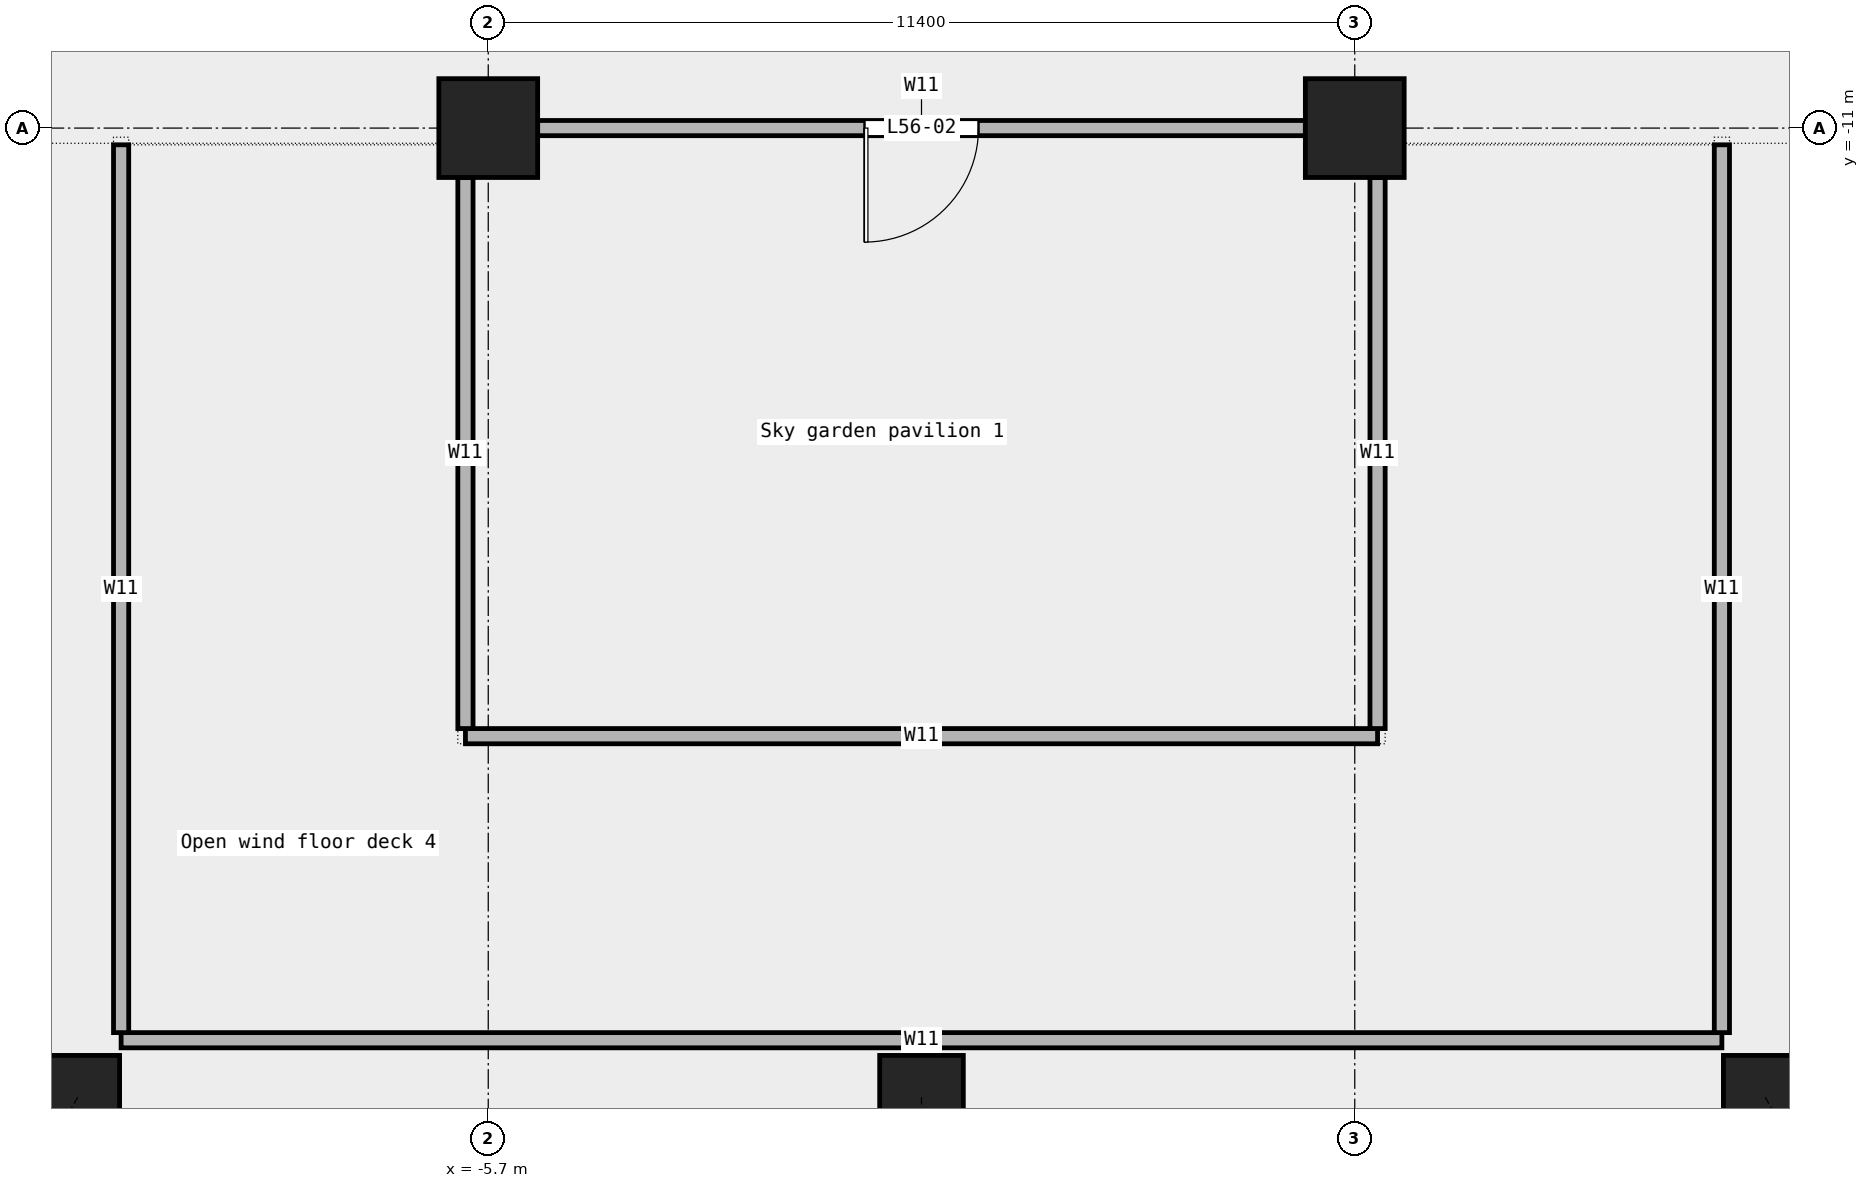
"""IFC4 building model, lengths in metres.
Left out: names, types, materials, properties, quantities, classifications, styles, units other than length and angle.
Written with IfcOpenShell. Run it as: python <this file> out.ifc"""

import sys

from ifc_helpers import new_model, si_unit, direction, frame, frame_2d, origin, origin_2d, place, context, subcontext, project, spatial, rectangle, extrude, element, fill, save


model = new_model("IFC4")
c1 = context("Model", 3, precision=1e-05, world=origin(), true_north=direction((0.0, 1.0)))
c2 = subcontext(c1, "Body", "Model", "MODEL_VIEW")
j1 = project(units=[si_unit("LENGTHUNIT", "METRE"), si_unit("PLANEANGLEUNIT", "RADIAN")], contexts=[c1])
p1 = place(None, origin())
s1 = spatial("IfcSite", under=j1, at=p1, CompositionType="ELEMENT")
p2 = place(p1, origin())
s2 = spatial("IfcBuilding", under=s1, at=p2, CompositionType="ELEMENT")
p3 = place(p2, frame((0.0, 0.0, 259.0)))
s3 = spatial("IfcBuildingStorey", under=s2, at=p3, CompositionType="ELEMENT", Elevation=259.0)
p4 = place(p3, frame((-11.1, -23.75, 0.0), z_axis=(-0.085054467071, -0.146649781273, 0.985525027224), x_axis=(0.865037348799, -0.50170746973, 0.0)))
e1 = element("IfcColumn", 1, at=p4, inside=s3, PredefinedType="COLUMN", context=c2, shape_type="SweptSolid", body=[
    extrude(rectangle(XDim=1.1, YDim=1.1, at=origin_2d()), origin(), (0.0, 0.0, 1.0), 8.117),
])
p5 = place(p3, frame((0.0, -23.75, 0.0), z_axis=(0.0, -0.1471831283, 0.989109259255), x_axis=(1.0, 0.0, 0.0)))
e2 = element("IfcColumn", 2, at=p5, inside=s3, PredefinedType="COLUMN", context=c2, shape_type="SweptSolid", body=[
    extrude(rectangle(XDim=1.1, YDim=1.1, at=origin_2d()), origin(), (0.0, 0.0, 1.0), 8.088),
])
p6 = place(p3, frame((11.1, -23.75, 0.0), z_axis=(0.085054467071, -0.146649781273, 0.985525027224), x_axis=(0.865037348799, 0.50170746973, 0.0)))
e3 = element("IfcColumn", 3, at=p6, inside=s3, PredefinedType="COLUMN", context=c2, shape_type="SweptSolid", body=[
    extrude(rectangle(XDim=1.1, YDim=1.1, at=origin_2d()), origin(), (0.0, 0.0, 1.0), 8.117),
])
for number, where, z_axis, x_axis in (
    (4, (-5.7, -11.0, 0.0), (0.0, 0.0, 1.0), (1.0, 0.0, 0.0)),
    (5, (5.7, -11.0, 0.0), (0.0, 0.0, 1.0), (1.0, 0.0, 0.0)),
):
    element("IfcColumn", number, at=place(p3, frame(where, z_axis=z_axis, x_axis=x_axis)), inside=s3, PredefinedType="COLUMN", context=c2, shape_type="SweptSolid", body=[
        extrude(rectangle(XDim=1.3, YDim=1.3, at=origin_2d()), origin(), (0.0, 0.0, 1.0), 8.0),
    ])
p7 = place(p3, frame((-10.53, -23.0, 0.0), z_axis=(0.0, 0.0, 1.0), x_axis=(1.0, 0.0, 0.0)))
e6 = element("IfcWall", 6, at=p7, inside=s3, PredefinedType="PARTITIONING", context=c2, shape_type="SweptSolid", body=[
    extrude(rectangle(XDim=21.06, YDim=0.2, at=frame_2d((10.53, 0.0))), origin(), (0.0, 0.0, 1.0), 8.0),
])
p8 = place(p3, frame((-6.0, -19.0, 0.0), z_axis=(0.0, 0.0, 1.0), x_axis=(1.0, 0.0, 0.0)))
e7 = element("IfcWall", 7, at=p8, inside=s3, PredefinedType="PARTITIONING", context=c2, shape_type="SweptSolid", body=[
    extrude(rectangle(XDim=12.0, YDim=0.2, at=frame_2d((6.0, 0.0))), origin(), (0.0, 0.0, 1.0), 8.0),
])
p9 = place(p3, frame((-5.05, -11.0, 0.0), z_axis=(0.0, 0.0, 1.0), x_axis=(1.0, 0.0, 0.0)))
e8 = element("IfcWall", 8, at=p9, inside=s3, PredefinedType="PARTITIONING", context=c2, shape_type="SweptSolid", body=[
    extrude(rectangle(XDim=10.1, YDim=0.2, at=frame_2d((5.05, 0.0))), origin(), (0.0, 0.0, 1.0), 8.0),
])
p10 = place(p9, frame((4.3, 0.0, 0.0)))
e9 = element("IfcOpeningElement", 9, at=p10, cuts=e8, PredefinedType="OPENING", context=c2, shape_type="SweptSolid", body=[
    extrude(rectangle(XDim=1.5, YDim=2.1, at=frame_2d((0.75, 1.05))), frame((0.0, 0.112, 0.0), z_axis=(0.0, -1.0, 0.0), x_axis=(1.0, 0.0, 0.0)), (0.0, 0.0, 1.0), 0.224),
])
p11 = place(p3, frame((-10.53, -22.9, 0.0), z_axis=(0.0, 0.0, 1.0), x_axis=(0.0, 1.0, 0.0)))
e10 = element("IfcWall", 10, at=p11, inside=s3, PredefinedType="PARTITIONING", context=c2, shape_type="SweptSolid", body=[
    extrude(rectangle(XDim=11.68, YDim=0.2, at=frame_2d((5.84, 0.0))), origin(), (0.0, 0.0, 1.0), 8.0),
])
for number, where, z_axis, x_axis in (
    (11, (-6.0, -18.9, 0.0), (0.0, 0.0, 1.0), (0.0, 1.0, 0.0)),
    (12, (6.0, -18.9, 0.0), (0.0, 0.0, 1.0), (0.0, 1.0, 0.0)),
):
    element("IfcWall", number, at=place(p3, frame(where, z_axis=z_axis, x_axis=x_axis)), inside=s3, PredefinedType="PARTITIONING", context=c2, shape_type="SweptSolid", body=[
        extrude(rectangle(XDim=7.25, YDim=0.2, at=frame_2d((3.625, 0.0))), origin(), (0.0, 0.0, 1.0), 8.0),
    ])
p12 = place(p3, frame((10.53, -22.9, 0.0), z_axis=(0.0, 0.0, 1.0), x_axis=(0.0, 1.0, 0.0)))
e13 = element("IfcWall", 13, at=p12, inside=s3, PredefinedType="PARTITIONING", context=c2, shape_type="SweptSolid", body=[
    extrude(rectangle(XDim=11.68, YDim=0.2, at=frame_2d((5.84, 0.0))), origin(), (0.0, 0.0, 1.0), 8.0),
])
p13 = place(p10, origin())
e14 = element("IfcDoor", 14, at=p13, inside=s3, OperationType="DOUBLE_DOOR_SINGLE_SWING", PredefinedType="DOOR", context=c2, shape_type="SweptSolid", body=[
    extrude(rectangle(XDim=1.5, YDim=2.1, at=frame_2d((0.75, 1.05))), frame((0.0, 0.025, 0.0), z_axis=(0.0, -1.0, 0.0), x_axis=(1.0, 0.0, 0.0)), (0.0, 0.0, 1.0), 0.05),
])
fill(e9, e14)
save(model, sys.argv[1])
